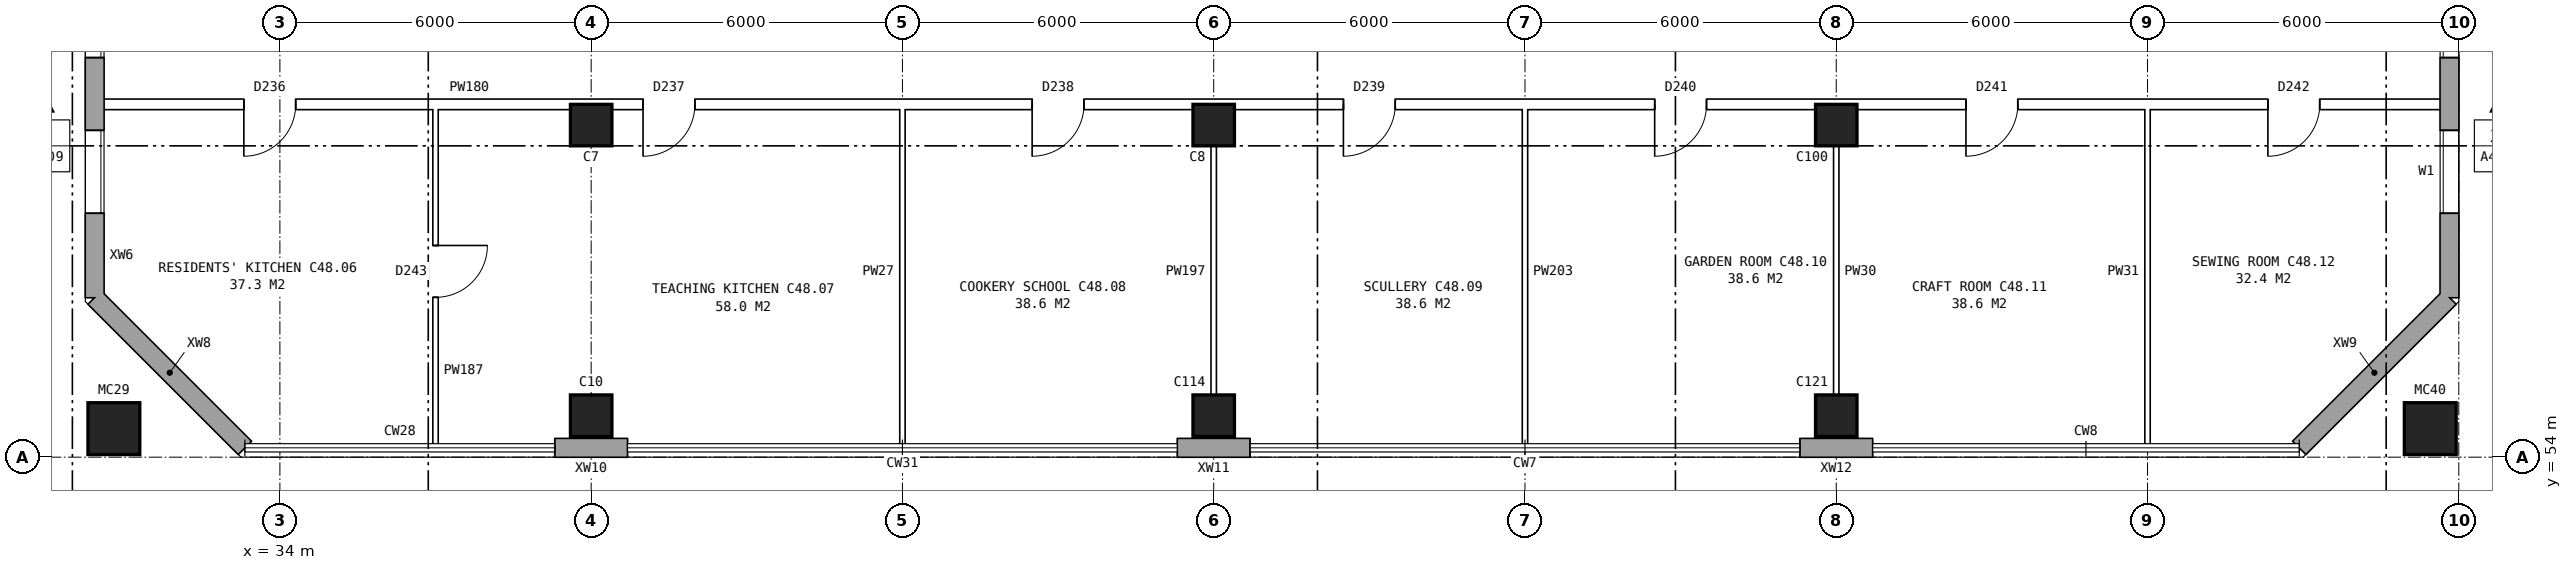
"""IFC4 building model, lengths in metres.
Left out: names, types, materials, properties, quantities, classifications, styles, units other than length and angle.
Written with IfcOpenShell. Run it as: python <this file> out.ifc"""

import sys

from ifc_helpers import new_model, si_unit, direction, frame, frame_2d, origin, origin_2d, place, context, subcontext, project, spatial, rectangle, hollow_rectangle, extrude, element, fill, save


model = new_model("IFC4")
c1 = context("Model", 3, precision=1e-05, world=origin(), true_north=direction((0.0, 1.0)))
c2 = subcontext(c1, "Body", "Model", "MODEL_VIEW")
j1 = project(units=[si_unit("LENGTHUNIT", "METRE"), si_unit("PLANEANGLEUNIT", "RADIAN")], contexts=[c1])
p1 = place(None, origin())
s1 = spatial("IfcSite", under=j1, at=p1, CompositionType="ELEMENT")
p2 = place(p1, origin())
s2 = spatial("IfcBuilding", under=s1, at=p2, CompositionType="ELEMENT")
p3 = place(p2, frame((0.0, 0.0, 171.6)))
s3 = spatial("IfcBuildingStorey", under=s2, at=p3, CompositionType="ELEMENT", Elevation=171.6)
for number, where, z_axis, x_axis in (
    (1, (40.0, 54.8, 0.0), (0.0, 0.0, 1.0), (1.0, 0.0, 0.0)),
    (2, (40.0, 60.4, 0.0), (0.0, 0.0, 1.0), (1.0, 0.0, 0.0)),
    (3, (52.0, 54.8, 0.0), (0.0, 0.0, 1.0), (1.0, 0.0, 0.0)),
    (4, (52.0, 60.4, 0.0), (0.0, 0.0, 1.0), (1.0, 0.0, 0.0)),
    (5, (64.0, 54.8, 0.0), (0.0, 0.0, 1.0), (1.0, 0.0, 0.0)),
    (6, (64.0, 60.4, 0.0), (0.0, 0.0, 1.0), (1.0, 0.0, 0.0)),
):
    element("IfcColumn", number, at=place(p3, frame(where, z_axis=z_axis, x_axis=x_axis)), inside=s3, PredefinedType="COLUMN", context=c2, shape_type="SweptSolid", body=[
        extrude(rectangle(XDim=0.8, YDim=0.8, at=origin_2d()), origin(), (0.0, 0.0, 1.0), 3.6),
    ])
for number, where, z_axis, x_axis in (
    (7, (30.8, 54.55, 0.0), (0.0, 0.0, 1.0), (1.0, 0.0, 0.0)),
    (8, (75.45, 54.55, 0.0), (0.0, 0.0, 1.0), (1.0, 0.0, 0.0)),
):
    element("IfcColumn", number, at=place(p3, frame(where, z_axis=z_axis, x_axis=x_axis)), inside=s3, PredefinedType="COLUMN", context=c2, shape_type="SweptSolid", body=[
        extrude(hollow_rectangle(XDim=1.0, YDim=1.0, WallThickness=0.055, at=origin_2d()), origin(), (0.0, 0.0, 1.0), 4.2),
    ])
p4 = place(p3, frame((30.43, 57.075, 0.0), z_axis=(0.0, 0.0, 1.0), x_axis=(0.707106781187, -0.707106781187, 0.0)))
e9 = element("IfcWall", 9, at=p4, inside=s3, PredefinedType="STANDARD", context=c2, shape_type="SweptSolid", body=[
    extrude(rectangle(XDim=4.094, YDim=0.36, at=frame_2d((2.047, 0.0))), origin(), (0.0, 0.0, 1.0), 3.6),
])
for number, where, z_axis, x_axis in (
    (10, (39.3, 54.18, 0.0), (0.0, 0.0, 1.0), (1.0, 0.0, 0.0)),
    (11, (51.3, 54.18, 0.0), (0.0, 0.0, 1.0), (1.0, 0.0, 0.0)),
    (12, (63.3, 54.18, 0.0), (0.0, 0.0, 1.0), (1.0, 0.0, 0.0)),
):
    element("IfcWall", number, at=place(p3, frame(where, z_axis=z_axis, x_axis=x_axis)), inside=s3, PredefinedType="STANDARD", context=c2, shape_type="SweptSolid", body=[
        extrude(rectangle(XDim=1.4, YDim=0.36, at=frame_2d((0.7, 0.0))), origin(), (0.0, 0.0, 1.0), 3.6),
    ])
p5 = place(p3, frame((72.925, 54.18, 0.0), z_axis=(0.0, 0.0, 1.0), x_axis=(0.707106781187, 0.707106781187, 0.0)))
e13 = element("IfcWall", 13, at=p5, inside=s3, PredefinedType="STANDARD", context=c2, shape_type="SweptSolid", body=[
    extrude(rectangle(XDim=4.094, YDim=0.36, at=frame_2d((2.047, 0.0))), origin(), (0.0, 0.0, 1.0), 3.6),
])
p6 = place(p3, frame((75.82, 57.075, 0.0), z_axis=(0.0, 0.0, 1.0), x_axis=(0.0, 1.0, 0.0)))
e14 = element("IfcWall", 14, at=p6, inside=s3, PredefinedType="STANDARD", context=c2, shape_type="SweptSolid", body=[
    extrude(rectangle(XDim=25.851, YDim=0.36, at=frame_2d((12.925, 0.0))), origin(), (0.0, 0.0, 1.0), 3.6),
])
p7 = place(p6, frame((1.625, 0.0, 0.8)))
e15 = element("IfcOpeningElement", 15, at=p7, cuts=e14, PredefinedType="OPENING", context=c2, shape_type="SweptSolid", body=[
    extrude(rectangle(XDim=1.6, YDim=1.8, at=frame_2d((0.8, 0.9))), frame((0.0, 0.19, 0.0), z_axis=(0.0, -1.0, 0.0), x_axis=(1.0, 0.0, 0.0)), (0.0, 0.0, 1.0), 0.38),
])
p8 = place(p6, frame((4.625, 0.0, 0.8)))
e16 = element("IfcOpeningElement", 16, at=p8, cuts=e14, PredefinedType="OPENING", context=c2, shape_type="SweptSolid", body=[
    extrude(rectangle(XDim=1.6, YDim=1.8, at=frame_2d((0.8, 0.9))), frame((0.0, 0.19, 0.0), z_axis=(0.0, -1.0, 0.0), x_axis=(1.0, 0.0, 0.0)), (0.0, 0.0, 1.0), 0.38),
])
p9 = place(p6, frame((19.625, 0.0, 0.8)))
e17 = element("IfcOpeningElement", 17, at=p9, cuts=e14, PredefinedType="OPENING", context=c2, shape_type="SweptSolid", body=[
    extrude(rectangle(XDim=1.6, YDim=1.8, at=frame_2d((0.8, 0.9))), frame((0.0, 0.19, 0.0), z_axis=(0.0, -1.0, 0.0), x_axis=(1.0, 0.0, 0.0)), (0.0, 0.0, 1.0), 0.38),
])
p10 = place(p6, frame((22.625, 0.0, 0.8)))
e18 = element("IfcOpeningElement", 18, at=p10, cuts=e14, PredefinedType="OPENING", context=c2, shape_type="SweptSolid", body=[
    extrude(rectangle(XDim=1.6, YDim=1.8, at=frame_2d((0.8, 0.9))), frame((0.0, 0.19, 0.0), z_axis=(0.0, -1.0, 0.0), x_axis=(1.0, 0.0, 0.0)), (0.0, 0.0, 1.0), 0.38),
])
p11 = place(p3, frame((30.43, 82.925, 0.0), z_axis=(0.0, 0.0, 1.0), x_axis=(0.0, -1.0, 0.0)))
e19 = element("IfcWall", 19, at=p11, inside=s3, PredefinedType="STANDARD", context=c2, shape_type="SweptSolid", body=[
    extrude(rectangle(XDim=25.851, YDim=0.36, at=frame_2d((12.925, 0.0))), origin(), (0.0, 0.0, 1.0), 3.6),
])
p12 = place(p11, frame((1.625, 0.0, 0.8)))
e20 = element("IfcOpeningElement", 20, at=p12, cuts=e19, PredefinedType="OPENING", context=c2, shape_type="SweptSolid", body=[
    extrude(rectangle(XDim=1.6, YDim=1.8, at=frame_2d((0.8, 0.9))), frame((0.0, 0.19, 0.0), z_axis=(0.0, -1.0, 0.0), x_axis=(1.0, 0.0, 0.0)), (0.0, 0.0, 1.0), 0.38),
])
p13 = place(p11, frame((4.625, 0.0, 0.8)))
e21 = element("IfcOpeningElement", 21, at=p13, cuts=e19, PredefinedType="OPENING", context=c2, shape_type="SweptSolid", body=[
    extrude(rectangle(XDim=1.6, YDim=1.8, at=frame_2d((0.8, 0.9))), frame((0.0, 0.19, 0.0), z_axis=(0.0, -1.0, 0.0), x_axis=(1.0, 0.0, 0.0)), (0.0, 0.0, 1.0), 0.38),
])
p14 = place(p11, frame((7.625, 0.0, 0.8)))
e22 = element("IfcOpeningElement", 22, at=p14, cuts=e19, PredefinedType="OPENING", context=c2, shape_type="SweptSolid", body=[
    extrude(rectangle(XDim=1.6, YDim=1.8, at=frame_2d((0.8, 0.9))), frame((0.0, 0.19, 0.0), z_axis=(0.0, -1.0, 0.0), x_axis=(1.0, 0.0, 0.0)), (0.0, 0.0, 1.0), 0.38),
])
p15 = place(p11, frame((10.625, 0.0, 0.8)))
e23 = element("IfcOpeningElement", 23, at=p15, cuts=e19, PredefinedType="OPENING", context=c2, shape_type="SweptSolid", body=[
    extrude(rectangle(XDim=1.6, YDim=1.8, at=frame_2d((0.8, 0.9))), frame((0.0, 0.19, 0.0), z_axis=(0.0, -1.0, 0.0), x_axis=(1.0, 0.0, 0.0)), (0.0, 0.0, 1.0), 0.38),
])
p16 = place(p11, frame((13.625, 0.0, 0.8)))
e24 = element("IfcOpeningElement", 24, at=p16, cuts=e19, PredefinedType="OPENING", context=c2, shape_type="SweptSolid", body=[
    extrude(rectangle(XDim=1.6, YDim=1.8, at=frame_2d((0.8, 0.9))), frame((0.0, 0.19, 0.0), z_axis=(0.0, -1.0, 0.0), x_axis=(1.0, 0.0, 0.0)), (0.0, 0.0, 1.0), 0.38),
])
p17 = place(p11, frame((16.625, 0.0, 0.8)))
e25 = element("IfcOpeningElement", 25, at=p17, cuts=e19, PredefinedType="OPENING", context=c2, shape_type="SweptSolid", body=[
    extrude(rectangle(XDim=1.6, YDim=1.8, at=frame_2d((0.8, 0.9))), frame((0.0, 0.19, 0.0), z_axis=(0.0, -1.0, 0.0), x_axis=(1.0, 0.0, 0.0)), (0.0, 0.0, 1.0), 0.38),
])
p18 = place(p11, frame((19.625, 0.0, 0.8)))
e26 = element("IfcOpeningElement", 26, at=p18, cuts=e19, PredefinedType="OPENING", context=c2, shape_type="SweptSolid", body=[
    extrude(rectangle(XDim=1.6, YDim=1.8, at=frame_2d((0.8, 0.9))), frame((0.0, 0.19, 0.0), z_axis=(0.0, -1.0, 0.0), x_axis=(1.0, 0.0, 0.0)), (0.0, 0.0, 1.0), 0.38),
])
p19 = place(p11, frame((22.625, 0.0, 0.8)))
e27 = element("IfcOpeningElement", 27, at=p19, cuts=e19, PredefinedType="OPENING", context=c2, shape_type="SweptSolid", body=[
    extrude(rectangle(XDim=1.6, YDim=1.8, at=frame_2d((0.8, 0.9))), frame((0.0, 0.19, 0.0), z_axis=(0.0, -1.0, 0.0), x_axis=(1.0, 0.0, 0.0)), (0.0, 0.0, 1.0), 0.38),
])
p20 = place(p3, frame((30.49, 60.8, 0.0), z_axis=(0.0, 0.0, 1.0), x_axis=(1.0, 0.0, 0.0)))
e28 = element("IfcWall", 28, at=p20, inside=s3, PredefinedType="PARTITIONING", context=c2, shape_type="SweptSolid", body=[
    extrude(rectangle(XDim=45.27, YDim=0.2, at=frame_2d((22.635, 0.0))), origin(), (0.0, 0.0, 1.0), 3.6),
])
p21 = place(p20, frame((2.815, 0.0, 0.0)))
e29 = element("IfcOpeningElement", 29, at=p21, cuts=e28, PredefinedType="OPENING", context=c2, shape_type="SweptSolid", body=[
    extrude(rectangle(XDim=1.0, YDim=2.1, at=frame_2d((0.5, 1.05))), frame((0.0, 0.11, 0.0), z_axis=(0.0, -1.0, 0.0), x_axis=(1.0, 0.0, 0.0)), (0.0, 0.0, 1.0), 0.22),
])
p22 = place(p20, frame((10.51, 0.0, 0.0)))
e30 = element("IfcOpeningElement", 30, at=p22, cuts=e28, PredefinedType="OPENING", context=c2, shape_type="SweptSolid", body=[
    extrude(rectangle(XDim=1.0, YDim=2.1, at=frame_2d((0.5, 1.05))), frame((0.0, 0.11, 0.0), z_axis=(0.0, -1.0, 0.0), x_axis=(1.0, 0.0, 0.0)), (0.0, 0.0, 1.0), 0.22),
])
p23 = place(p20, frame((18.01, 0.0, 0.0)))
e31 = element("IfcOpeningElement", 31, at=p23, cuts=e28, PredefinedType="OPENING", context=c2, shape_type="SweptSolid", body=[
    extrude(rectangle(XDim=1.0, YDim=2.1, at=frame_2d((0.5, 1.05))), frame((0.0, 0.11, 0.0), z_axis=(0.0, -1.0, 0.0), x_axis=(1.0, 0.0, 0.0)), (0.0, 0.0, 1.0), 0.22),
])
p24 = place(p20, frame((24.01, 0.0, 0.0)))
e32 = element("IfcOpeningElement", 32, at=p24, cuts=e28, PredefinedType="OPENING", context=c2, shape_type="SweptSolid", body=[
    extrude(rectangle(XDim=1.0, YDim=2.1, at=frame_2d((0.5, 1.05))), frame((0.0, 0.11, 0.0), z_axis=(0.0, -1.0, 0.0), x_axis=(1.0, 0.0, 0.0)), (0.0, 0.0, 1.0), 0.22),
])
p25 = place(p20, frame((30.01, 0.0, 0.0)))
e33 = element("IfcOpeningElement", 33, at=p25, cuts=e28, PredefinedType="OPENING", context=c2, shape_type="SweptSolid", body=[
    extrude(rectangle(XDim=1.0, YDim=2.1, at=frame_2d((0.5, 1.05))), frame((0.0, 0.11, 0.0), z_axis=(0.0, -1.0, 0.0), x_axis=(1.0, 0.0, 0.0)), (0.0, 0.0, 1.0), 0.22),
])
p26 = place(p20, frame((36.01, 0.0, 0.0)))
e34 = element("IfcOpeningElement", 34, at=p26, cuts=e28, PredefinedType="OPENING", context=c2, shape_type="SweptSolid", body=[
    extrude(rectangle(XDim=1.0, YDim=2.1, at=frame_2d((0.5, 1.05))), frame((0.0, 0.11, 0.0), z_axis=(0.0, -1.0, 0.0), x_axis=(1.0, 0.0, 0.0)), (0.0, 0.0, 1.0), 0.22),
])
p27 = place(p20, frame((41.83, 0.0, 0.0)))
e35 = element("IfcOpeningElement", 35, at=p27, cuts=e28, PredefinedType="OPENING", context=c2, shape_type="SweptSolid", body=[
    extrude(rectangle(XDim=1.0, YDim=2.1, at=frame_2d((0.5, 1.05))), frame((0.0, 0.11, 0.0), z_axis=(0.0, -1.0, 0.0), x_axis=(1.0, 0.0, 0.0)), (0.0, 0.0, 1.0), 0.22),
])
p28 = place(p3, frame((37.0, 54.24, 0.0), z_axis=(0.0, 0.0, 1.0), x_axis=(0.0, 1.0, 0.0)))
e36 = element("IfcWall", 36, at=p28, inside=s3, PredefinedType="PARTITIONING", context=c2, shape_type="SweptSolid", body=[
    extrude(rectangle(XDim=6.66, YDim=0.1, at=frame_2d((3.33, 0.0))), origin(), (0.0, 0.0, 1.0), 3.6),
])
p29 = place(p28, frame((2.84, 0.0, 0.0)))
e37 = element("IfcOpeningElement", 37, at=p29, cuts=e36, PredefinedType="OPENING", context=c2, shape_type="SweptSolid", body=[
    extrude(rectangle(XDim=1.0, YDim=2.1, at=frame_2d((0.5, 1.05))), frame((0.0, 0.06, 0.0), z_axis=(0.0, -1.0, 0.0), x_axis=(1.0, 0.0, 0.0)), (0.0, 0.0, 1.0), 0.12),
])
for number, where, z_axis, x_axis in (
    (38, (46.0, 54.24, 0.0), (0.0, 0.0, 1.0), (0.0, 1.0, 0.0)),
    (39, (52.0, 54.24, 0.0), (0.0, 0.0, 1.0), (0.0, 1.0, 0.0)),
    (40, (58.0, 54.24, 0.0), (0.0, 0.0, 1.0), (0.0, 1.0, 0.0)),
    (41, (64.0, 54.24, 0.0), (0.0, 0.0, 1.0), (0.0, 1.0, 0.0)),
    (42, (70.0, 54.24, 0.0), (0.0, 0.0, 1.0), (0.0, 1.0, 0.0)),
):
    element("IfcWall", number, at=place(p3, frame(where, z_axis=z_axis, x_axis=x_axis)), inside=s3, PredefinedType="PARTITIONING", context=c2, shape_type="SweptSolid", body=[
        extrude(rectangle(XDim=6.66, YDim=0.1, at=frame_2d((3.33, 0.0))), origin(), (0.0, 0.0, 1.0), 3.6),
    ])
p30 = place(p7, origin())
e43 = element("IfcWindow", 43, at=p30, inside=s3, PartitioningType="SINGLE_PANEL", PredefinedType="WINDOW", context=c2, shape_type="SweptSolid", body=[
    extrude(rectangle(XDim=1.6, YDim=1.8, at=frame_2d((0.8, 0.9))), frame((0.0, 0.15, 0.0), z_axis=(0.0, -1.0, 0.0), x_axis=(1.0, 0.0, 0.0)), (0.0, 0.0, 1.0), 0.06),
])
fill(e15, e43)
p31 = place(p8, origin())
e44 = element("IfcWindow", 44, at=p31, inside=s3, PartitioningType="SINGLE_PANEL", PredefinedType="WINDOW", context=c2, shape_type="SweptSolid", body=[
    extrude(rectangle(XDim=1.6, YDim=1.8, at=frame_2d((0.8, 0.9))), frame((0.0, 0.15, 0.0), z_axis=(0.0, -1.0, 0.0), x_axis=(1.0, 0.0, 0.0)), (0.0, 0.0, 1.0), 0.06),
])
fill(e16, e44)
p32 = place(p18, origin())
e45 = element("IfcWindow", 45, at=p32, inside=s3, PartitioningType="SINGLE_PANEL", PredefinedType="WINDOW", context=c2, shape_type="SweptSolid", body=[
    extrude(rectangle(XDim=1.6, YDim=1.8, at=frame_2d((0.8, 0.9))), frame((0.0, 0.15, 0.0), z_axis=(0.0, -1.0, 0.0), x_axis=(1.0, 0.0, 0.0)), (0.0, 0.0, 1.0), 0.06),
])
fill(e26, e45)
p33 = place(p19, origin())
e46 = element("IfcWindow", 46, at=p33, inside=s3, PartitioningType="SINGLE_PANEL", PredefinedType="WINDOW", context=c2, shape_type="SweptSolid", body=[
    extrude(rectangle(XDim=1.6, YDim=1.8, at=frame_2d((0.8, 0.9))), frame((0.0, 0.15, 0.0), z_axis=(0.0, -1.0, 0.0), x_axis=(1.0, 0.0, 0.0)), (0.0, 0.0, 1.0), 0.06),
])
fill(e27, e46)
p34 = place(p21, frame((1.0, 0.0, 0.0), z_axis=(0.0, 0.0, 1.0), x_axis=(-1.0, 0.0, 0.0)))
e47 = element("IfcDoor", 47, at=p34, inside=s3, OperationType="SINGLE_SWING_RIGHT", PredefinedType="DOOR", context=c2, shape_type="SweptSolid", body=[
    extrude(rectangle(XDim=1.0, YDim=2.1, at=frame_2d((0.5, 1.05))), frame((0.0, 0.025, 0.0), z_axis=(0.0, -1.0, 0.0), x_axis=(1.0, 0.0, 0.0)), (0.0, 0.0, 1.0), 0.05),
])
fill(e29, e47)
p35 = place(p22, frame((1.0, 0.0, 0.0), z_axis=(0.0, 0.0, 1.0), x_axis=(-1.0, 0.0, 0.0)))
e48 = element("IfcDoor", 48, at=p35, inside=s3, OperationType="SINGLE_SWING_RIGHT", PredefinedType="DOOR", context=c2, shape_type="SweptSolid", body=[
    extrude(rectangle(XDim=1.0, YDim=2.1, at=frame_2d((0.5, 1.05))), frame((0.0, 0.025, 0.0), z_axis=(0.0, -1.0, 0.0), x_axis=(1.0, 0.0, 0.0)), (0.0, 0.0, 1.0), 0.05),
])
fill(e30, e48)
p36 = place(p23, frame((1.0, 0.0, 0.0), z_axis=(0.0, 0.0, 1.0), x_axis=(-1.0, 0.0, 0.0)))
e49 = element("IfcDoor", 49, at=p36, inside=s3, OperationType="SINGLE_SWING_RIGHT", PredefinedType="DOOR", context=c2, shape_type="SweptSolid", body=[
    extrude(rectangle(XDim=1.0, YDim=2.1, at=frame_2d((0.5, 1.05))), frame((0.0, 0.025, 0.0), z_axis=(0.0, -1.0, 0.0), x_axis=(1.0, 0.0, 0.0)), (0.0, 0.0, 1.0), 0.05),
])
fill(e31, e49)
p37 = place(p24, frame((1.0, 0.0, 0.0), z_axis=(0.0, 0.0, 1.0), x_axis=(-1.0, 0.0, 0.0)))
e50 = element("IfcDoor", 50, at=p37, inside=s3, OperationType="SINGLE_SWING_RIGHT", PredefinedType="DOOR", context=c2, shape_type="SweptSolid", body=[
    extrude(rectangle(XDim=1.0, YDim=2.1, at=frame_2d((0.5, 1.05))), frame((0.0, 0.025, 0.0), z_axis=(0.0, -1.0, 0.0), x_axis=(1.0, 0.0, 0.0)), (0.0, 0.0, 1.0), 0.05),
])
fill(e32, e50)
p38 = place(p25, frame((1.0, 0.0, 0.0), z_axis=(0.0, 0.0, 1.0), x_axis=(-1.0, 0.0, 0.0)))
e51 = element("IfcDoor", 51, at=p38, inside=s3, OperationType="SINGLE_SWING_RIGHT", PredefinedType="DOOR", context=c2, shape_type="SweptSolid", body=[
    extrude(rectangle(XDim=1.0, YDim=2.1, at=frame_2d((0.5, 1.05))), frame((0.0, 0.025, 0.0), z_axis=(0.0, -1.0, 0.0), x_axis=(1.0, 0.0, 0.0)), (0.0, 0.0, 1.0), 0.05),
])
fill(e33, e51)
p39 = place(p26, frame((1.0, 0.0, 0.0), z_axis=(0.0, 0.0, 1.0), x_axis=(-1.0, 0.0, 0.0)))
e52 = element("IfcDoor", 52, at=p39, inside=s3, OperationType="SINGLE_SWING_RIGHT", PredefinedType="DOOR", context=c2, shape_type="SweptSolid", body=[
    extrude(rectangle(XDim=1.0, YDim=2.1, at=frame_2d((0.5, 1.05))), frame((0.0, 0.025, 0.0), z_axis=(0.0, -1.0, 0.0), x_axis=(1.0, 0.0, 0.0)), (0.0, 0.0, 1.0), 0.05),
])
fill(e34, e52)
p40 = place(p27, frame((1.0, 0.0, 0.0), z_axis=(0.0, 0.0, 1.0), x_axis=(-1.0, 0.0, 0.0)))
e53 = element("IfcDoor", 53, at=p40, inside=s3, OperationType="SINGLE_SWING_RIGHT", PredefinedType="DOOR", context=c2, shape_type="SweptSolid", body=[
    extrude(rectangle(XDim=1.0, YDim=2.1, at=frame_2d((0.5, 1.05))), frame((0.0, 0.025, 0.0), z_axis=(0.0, -1.0, 0.0), x_axis=(1.0, 0.0, 0.0)), (0.0, 0.0, 1.0), 0.05),
])
fill(e35, e53)
p41 = place(p29, frame((1.0, 0.0, 0.0), z_axis=(0.0, 0.0, 1.0), x_axis=(-1.0, 0.0, 0.0)))
e54 = element("IfcDoor", 54, at=p41, inside=s3, OperationType="SINGLE_SWING_LEFT", PredefinedType="DOOR", context=c2, shape_type="SweptSolid", body=[
    extrude(rectangle(XDim=1.0, YDim=2.1, at=frame_2d((0.5, 1.05))), frame((0.0, 0.025, 0.0), z_axis=(0.0, -1.0, 0.0), x_axis=(1.0, 0.0, 0.0)), (0.0, 0.0, 1.0), 0.05),
])
fill(e37, e54)
save(model, sys.argv[1])
